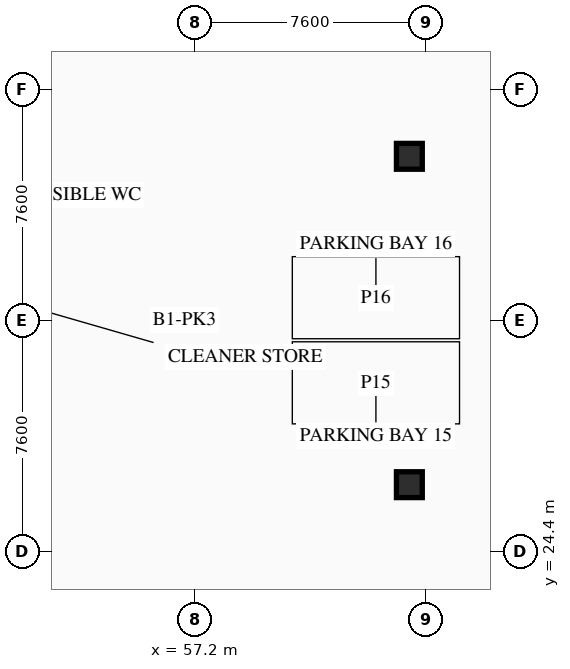
"""IFC4 building model, lengths in metres.
Left out: names, types, materials, properties, quantities, classifications, styles, units other than length and angle.
Written with IfcOpenShell. Run it as: python <this file> out.ifc"""

import sys

from ifc_helpers import new_model, si_unit, direction, frame, origin, origin_2d, place, context, subcontext, project, spatial, hollow_rectangle, extrude, element, save


model = new_model("IFC4")
c1 = context("Model", 3, precision=1e-05, world=origin(), true_north=direction((0.0, 1.0)))
c2 = subcontext(c1, "Body", "Model", "MODEL_VIEW")
j1 = project(units=[si_unit("LENGTHUNIT", "METRE"), si_unit("PLANEANGLEUNIT", "RADIAN")], contexts=[c1])
p1 = place(None, origin())
s1 = spatial("IfcSite", under=j1, at=p1, CompositionType="ELEMENT")
p2 = place(p1, origin())
s2 = spatial("IfcBuilding", under=s1, at=p2, CompositionType="ELEMENT")
p3 = place(p2, frame((0.0, 0.0, -5.5)))
s3 = spatial("IfcBuildingStorey", under=s2, at=p3, CompositionType="ELEMENT", Elevation=-5.5)
for number, where, z_axis, x_axis in (
    (1, (64.25, 26.6, 0.0), (0.0, 0.0, 1.0), (1.0, 0.0, 0.0)),
    (2, (64.25, 37.4, 0.0), (0.0, 0.0, 1.0), (1.0, 0.0, 0.0)),
):
    element("IfcColumn", number, at=place(p3, frame(where, z_axis=z_axis, x_axis=x_axis)), inside=s3, PredefinedType="COLUMN", context=c2, shape_type="SweptSolid", body=[
        extrude(hollow_rectangle(XDim=0.85, YDim=0.85, WallThickness=0.035, at=origin_2d()), origin(), (0.0, 0.0, 1.0), 5.2),
    ])
save(model, sys.argv[1])
